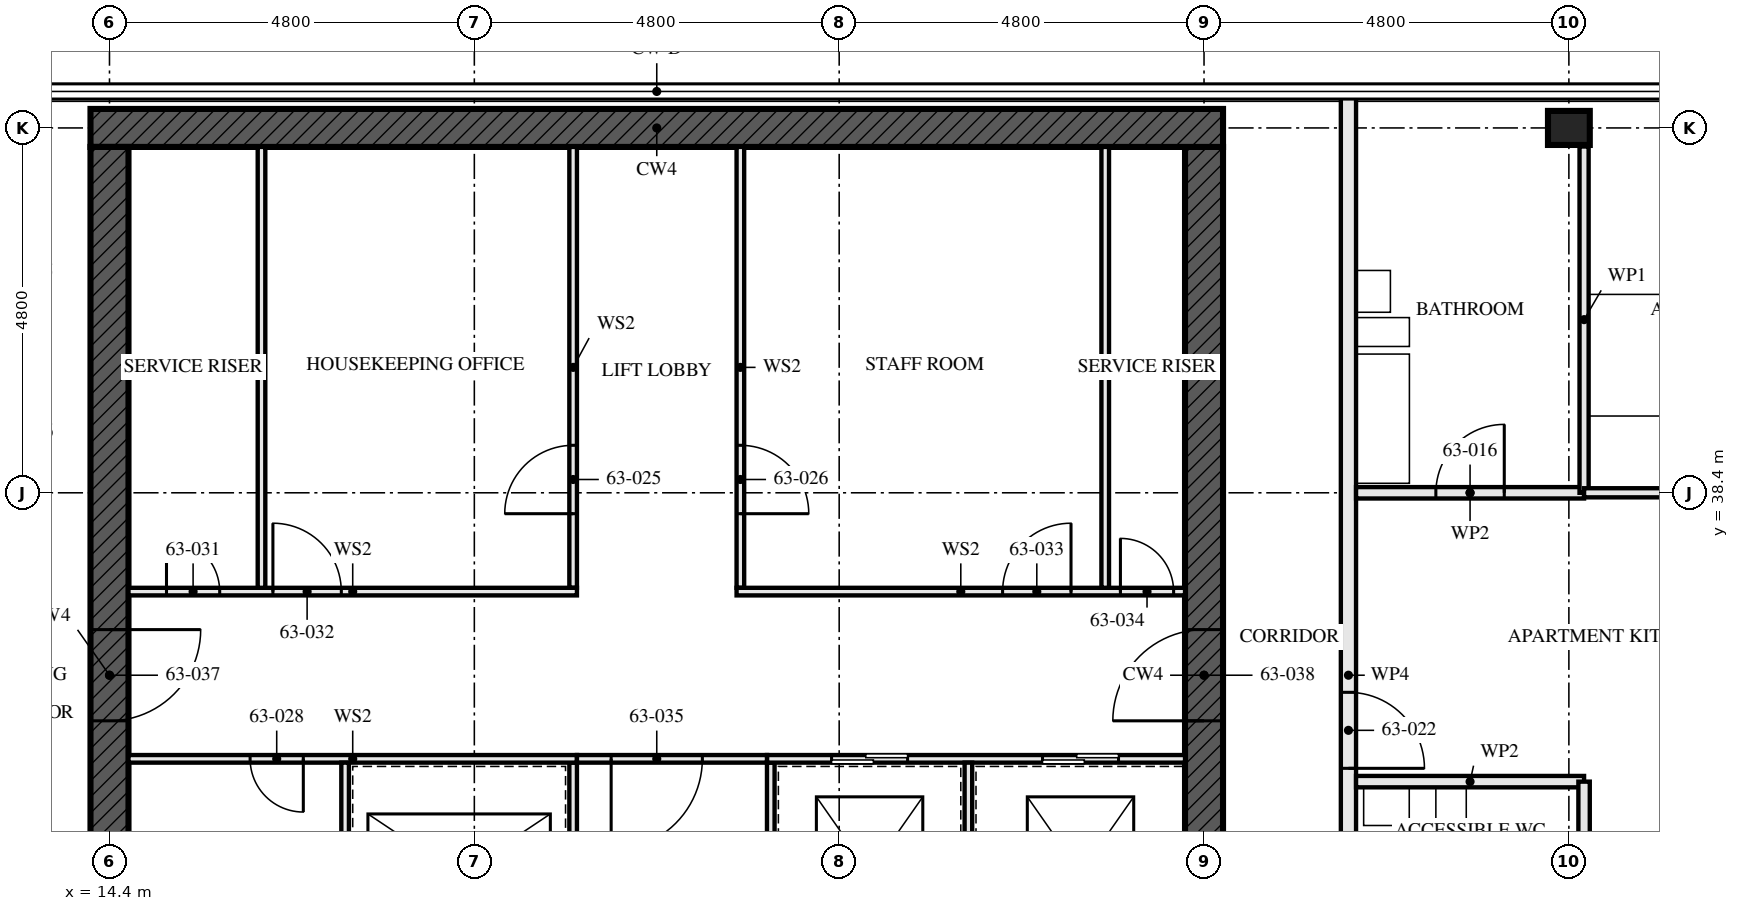
"""IFC4 building model, lengths in metres.
Left out: names, types, materials, properties, quantities, classifications, styles, units other than length and angle.
Written with IfcOpenShell. Run it as: python <this file> out.ifc"""

import sys

from ifc_helpers import new_model, si_unit, direction, frame, frame_2d, origin, origin_2d, place, context, subcontext, project, spatial, rectangle, i_section, extrude, element, fill, save


model = new_model("IFC4")
c1 = context("Model", 3, precision=1e-05, world=origin(), true_north=direction((0.0, 1.0)))
c2 = subcontext(c1, "Body", "Model", "MODEL_VIEW")
j1 = project(units=[si_unit("LENGTHUNIT", "METRE"), si_unit("PLANEANGLEUNIT", "RADIAN")], contexts=[c1])
p1 = place(None, origin())
s1 = spatial("IfcSite", under=j1, at=p1, CompositionType="ELEMENT")
p2 = place(p1, origin())
s2 = spatial("IfcBuilding", under=s1, at=p2, CompositionType="ELEMENT")
p3 = place(p2, frame((0.0, 0.0, 229.5)))
s3 = spatial("IfcBuildingStorey", under=s2, at=p3, CompositionType="ELEMENT", Elevation=229.5)
p4 = place(p3, frame((33.6, 43.2, 0.0), z_axis=(0.0, 0.0, 1.0), x_axis=(0.0, 1.0, 0.0)))
e1 = element("IfcColumn", 1, at=p4, inside=s3, PredefinedType="COLUMN", context=c2, shape_type="SweptSolid", body=[
    extrude(i_section(OverallWidth=0.448, OverallDepth=0.55, WebThickness=0.072, FlangeThickness=0.115, FilletRadius=0.015, at=origin_2d()), origin(), (0.0, 0.0, 1.0), 3.5),
])
p5 = place(p3, frame((29.05, 43.2, -0.17), z_axis=(0.0, 0.0, 1.0), x_axis=(-1.0, 0.0, 0.0)))
e2 = element("IfcWall", 2, at=p5, inside=s3, PredefinedType="SHEAR", context=c2, shape_type="SweptSolid", body=[
    extrude(rectangle(XDim=14.9, YDim=0.5, at=frame_2d((7.45, 0.0))), origin(), (0.0, 0.0, 1.0), 3.5),
])
p6 = place(p3, frame((14.4, 42.95, -0.17), z_axis=(0.0, 0.0, 1.0), x_axis=(0.0, -1.0, 0.0)))
e3 = element("IfcWall", 3, at=p6, inside=s3, PredefinedType="SHEAR", context=c2, shape_type="SweptSolid", body=[
    extrude(rectangle(XDim=13.9, YDim=0.5, at=frame_2d((6.95, 0.0))), origin(), (0.0, 0.0, 1.0), 3.5),
])
p7 = place(p6, frame((6.35, 0.0, 0.17)))
e4 = element("IfcOpeningElement", 4, at=p7, cuts=e3, PredefinedType="OPENING", context=c2, shape_type="SweptSolid", body=[
    extrude(rectangle(XDim=1.2, YDim=2.1, at=frame_2d((0.6, 1.05))), frame((0.0, 0.26, 0.0), z_axis=(0.0, -1.0, 0.0), x_axis=(1.0, 0.0, 0.0)), (0.0, 0.0, 1.0), 0.521),
])
p8 = place(p3, frame((28.8, 29.05, -0.17), z_axis=(0.0, 0.0, 1.0), x_axis=(0.0, 1.0, 0.0)))
e5 = element("IfcWall", 5, at=p8, inside=s3, PredefinedType="SHEAR", context=c2, shape_type="SweptSolid", body=[
    extrude(rectangle(XDim=13.9, YDim=0.5, at=frame_2d((6.95, 0.0))), origin(), (0.0, 0.0, 1.0), 3.5),
])
p9 = place(p8, frame((6.35, 0.0, 0.17)))
e6 = element("IfcOpeningElement", 6, at=p9, cuts=e5, PredefinedType="OPENING", context=c2, shape_type="SweptSolid", body=[
    extrude(rectangle(XDim=1.2, YDim=2.1, at=frame_2d((0.6, 1.05))), frame((0.0, 0.26, 0.0), z_axis=(0.0, -1.0, 0.0), x_axis=(1.0, 0.0, 0.0)), (0.0, 0.0, 1.0), 0.521),
])
p10 = place(p3, frame((33.8, 32.2, 0.0), z_axis=(0.0, 0.0, 1.0), x_axis=(0.0, 1.0, 0.0)))
e7 = element("IfcWall", 7, at=p10, inside=s3, PredefinedType="PARTITIONING", context=c2, shape_type="SweptSolid", body=[
    extrude(rectangle(XDim=2.4, YDim=0.15, at=frame_2d((1.2, 0.0))), origin(), (0.0, 0.0, 1.0), 2.55),
])
p11 = place(p3, frame((33.8, 34.6, 0.0), z_axis=(0.0, 0.0, 1.0), x_axis=(-1.0, 0.0, 0.0)))
e8 = element("IfcWall", 8, at=p11, inside=s3, PredefinedType="PARTITIONING", context=c2, shape_type="SweptSolid", body=[
    extrude(rectangle(XDim=3.0, YDim=0.15, at=frame_2d((1.5, 0.0))), origin(), (0.0, 0.0, 1.0), 3.33),
])
p12 = place(p3, frame((33.8, 38.4, 0.0), z_axis=(0.0, 0.0, 1.0), x_axis=(-1.0, 0.0, 0.0)))
e9 = element("IfcWall", 9, at=p12, inside=s3, PredefinedType="PARTITIONING", context=c2, shape_type="SweptSolid", body=[
    extrude(rectangle(XDim=3.0, YDim=0.15, at=frame_2d((1.5, 0.0))), origin(), (0.0, 0.0, 1.0), 2.55),
])
p13 = place(p12, frame((1.05, 0.0, 0.0)))
e10 = element("IfcOpeningElement", 10, at=p13, cuts=e9, PredefinedType="OPENING", context=c2, shape_type="SweptSolid", body=[
    extrude(rectangle(XDim=0.9, YDim=2.1, at=frame_2d((0.45, 1.05))), frame((0.0, 0.085, 0.0), z_axis=(0.0, -1.0, 0.0), x_axis=(1.0, 0.0, 0.0)), (0.0, 0.0, 1.0), 0.171),
])
p14 = place(p3, frame((33.8, 38.4, 0.0), z_axis=(0.0, 0.0, 1.0), x_axis=(0.0, 1.0, 0.0)))
e11 = element("IfcWall", 11, at=p14, inside=s3, PredefinedType="PARTITIONING", context=c2, shape_type="SweptSolid", body=[
    extrude(rectangle(XDim=4.556, YDim=0.12, at=frame_2d((2.278, 0.0))), origin(), (0.0, 0.0, 1.0), 3.33),
])
p15 = place(p3, frame((38.08, 38.4, 0.0), z_axis=(0.0, 0.0, 1.0), x_axis=(-1.0, 0.0, 0.0)))
e12 = element("IfcWall", 12, at=p15, inside=s3, PredefinedType="PARTITIONING", context=c2, shape_type="SweptSolid", body=[
    extrude(rectangle(XDim=4.28, YDim=0.12, at=frame_2d((2.14, 0.0))), origin(), (0.0, 0.0, 1.0), 2.55),
])
p16 = place(p15, frame((1.93, 0.0, 0.0)))
e13 = element("IfcOpeningElement", 13, at=p16, cuts=e12, PredefinedType="OPENING", context=c2, shape_type="SweptSolid", body=[
    extrude(rectangle(XDim=0.9, YDim=2.1, at=frame_2d((0.45, 1.05))), frame((0.0, 0.071, 0.0), z_axis=(0.0, -1.0, 0.0), x_axis=(1.0, 0.0, 0.0)), (0.0, 0.0, 1.0), 0.141),
])
p17 = place(p3, frame((30.7, 28.345, 0.0), z_axis=(0.0, 0.0, 1.0), x_axis=(0.0, 1.0, 0.0)))
e14 = element("IfcWall", 14, at=p17, inside=s3, PredefinedType="PARTITIONING", context=c2, shape_type="SweptSolid", body=[
    extrude(rectangle(XDim=15.31, YDim=0.2, at=frame_2d((7.655, 0.0))), origin(), (0.0, 0.0, 1.0), 2.32),
])
p18 = place(p17, frame((1.855, 0.0, 0.0)))
e15 = element("IfcOpeningElement", 15, at=p18, cuts=e14, PredefinedType="OPENING", context=c2, shape_type="SweptSolid", body=[
    extrude(rectangle(XDim=1.0, YDim=2.1, at=frame_2d((0.5, 1.05))), frame((0.0, 0.111, 0.0), z_axis=(0.0, -1.0, 0.0), x_axis=(1.0, 0.0, 0.0)), (0.0, 0.0, 1.0), 0.221),
])
p19 = place(p17, frame((4.555, 0.0, 0.0)))
e16 = element("IfcOpeningElement", 16, at=p19, cuts=e14, PredefinedType="OPENING", context=c2, shape_type="SweptSolid", body=[
    extrude(rectangle(XDim=1.0, YDim=2.1, at=frame_2d((0.5, 1.05))), frame((0.0, 0.111, 0.0), z_axis=(0.0, -1.0, 0.0), x_axis=(1.0, 0.0, 0.0)), (0.0, 0.0, 1.0), 0.221),
])
p20 = place(p17, frame((6.43, 0.0, 0.0)))
e17 = element("IfcOpeningElement", 17, at=p20, cuts=e14, PredefinedType="OPENING", context=c2, shape_type="SweptSolid", body=[
    extrude(rectangle(XDim=1.0, YDim=2.1, at=frame_2d((0.5, 1.05))), frame((0.0, 0.111, 0.0), z_axis=(0.0, -1.0, 0.0), x_axis=(1.0, 0.0, 0.0)), (0.0, 0.0, 1.0), 0.221),
])
for number, where, z_axis, x_axis in (
    (18, (16.4, 37.15, 0.0), (0.0, 0.0, 1.0), (0.0, 1.0, 0.0)),
    (19, (27.5, 37.15, 0.0), (0.0, 0.0, 1.0), (0.0, 1.0, 0.0)),
):
    element("IfcWall", number, at=place(p3, frame(where, z_axis=z_axis, x_axis=x_axis)), inside=s3, PredefinedType="SOLIDWALL", context=c2, shape_type="SweptSolid", body=[
        extrude(rectangle(XDim=5.8, YDim=0.1, at=frame_2d((2.9, 0.0))), origin(), (0.0, 0.0, 1.0), 3.33),
    ])
p21 = place(p3, frame((20.5, 29.05, 0.0), z_axis=(0.0, 0.0, 1.0), x_axis=(0.0, 1.0, 0.0)))
e20 = element("IfcWall", 20, at=p21, inside=s3, PredefinedType="SOLIDWALL", context=c2, shape_type="SweptSolid", body=[
    extrude(rectangle(XDim=5.8, YDim=0.1, at=frame_2d((2.9, 0.0))), origin(), (0.0, 0.0, 1.0), 3.33),
])
p22 = place(p21, frame((0.8, 0.0, 0.0)))
e21 = element("IfcOpeningElement", 21, at=p22, cuts=e20, PredefinedType="OPENING", context=c2, shape_type="SweptSolid", body=[
    extrude(rectangle(XDim=1.1, YDim=2.3, at=frame_2d((0.55, 1.15))), frame((0.0, 0.061, 0.0), z_axis=(0.0, -1.0, 0.0), x_axis=(1.0, 0.0, 0.0)), (0.0, 0.0, 1.0), 0.121),
])
p23 = place(p21, frame((3.775, 0.0, 0.0)))
e22 = element("IfcOpeningElement", 22, at=p23, cuts=e20, PredefinedType="OPENING", context=c2, shape_type="SweptSolid", body=[
    extrude(rectangle(XDim=1.1, YDim=2.3, at=frame_2d((0.55, 1.15))), frame((0.0, 0.061, 0.0), z_axis=(0.0, -1.0, 0.0), x_axis=(1.0, 0.0, 0.0)), (0.0, 0.0, 1.0), 0.121),
])
p24 = place(p3, frame((20.5, 37.15, 0.0), z_axis=(0.0, 0.0, 1.0), x_axis=(0.0, 1.0, 0.0)))
e23 = element("IfcWall", 23, at=p24, inside=s3, PredefinedType="SOLIDWALL", context=c2, shape_type="SweptSolid", body=[
    extrude(rectangle(XDim=5.8, YDim=0.1, at=frame_2d((2.9, 0.0))), origin(), (0.0, 0.0, 1.0), 3.33),
])
p25 = place(p24, frame((0.975, 0.0, 0.0)))
e24 = element("IfcOpeningElement", 24, at=p25, cuts=e23, PredefinedType="OPENING", context=c2, shape_type="SweptSolid", body=[
    extrude(rectangle(XDim=0.9, YDim=2.1, at=frame_2d((0.45, 1.05))), frame((0.0, 0.061, 0.0), z_axis=(0.0, -1.0, 0.0), x_axis=(1.0, 0.0, 0.0)), (0.0, 0.0, 1.0), 0.121),
])
p26 = place(p3, frame((22.7, 37.15, 0.0), z_axis=(0.0, 0.0, 1.0), x_axis=(0.0, 1.0, 0.0)))
e25 = element("IfcWall", 25, at=p26, inside=s3, PredefinedType="SOLIDWALL", context=c2, shape_type="SweptSolid", body=[
    extrude(rectangle(XDim=5.8, YDim=0.1, at=frame_2d((2.9, 0.0))), origin(), (0.0, 0.0, 1.0), 3.33),
])
p27 = place(p26, frame((0.975, 0.0, 0.0)))
e26 = element("IfcOpeningElement", 26, at=p27, cuts=e25, PredefinedType="OPENING", context=c2, shape_type="SweptSolid", body=[
    extrude(rectangle(XDim=0.9, YDim=2.1, at=frame_2d((0.45, 1.05))), frame((0.0, 0.061, 0.0), z_axis=(0.0, -1.0, 0.0), x_axis=(1.0, 0.0, 0.0)), (0.0, 0.0, 1.0), 0.121),
])
p28 = place(p3, frame((23.1, 29.05, 0.0), z_axis=(0.0, 0.0, 1.0), x_axis=(0.0, 1.0, 0.0)))
e27 = element("IfcWall", 27, at=p28, inside=s3, PredefinedType="SOLIDWALL", context=c2, shape_type="SweptSolid", body=[
    extrude(rectangle(XDim=5.8, YDim=0.1, at=frame_2d((2.9, 0.0))), origin(), (0.0, 0.0, 1.0), 3.33),
])
p29 = place(p28, frame((1.0, 0.0, 0.0)))
e28 = element("IfcOpeningElement", 28, at=p29, cuts=e27, PredefinedType="OPENING", context=c2, shape_type="SweptSolid", body=[
    extrude(rectangle(XDim=0.7, YDim=2.1, at=frame_2d((0.35, 1.05))), frame((0.0, 0.061, 0.0), z_axis=(0.0, -1.0, 0.0), x_axis=(1.0, 0.0, 0.0)), (0.0, 0.0, 1.0), 0.121),
])
p30 = place(p3, frame((14.65, 34.9, 0.0), z_axis=(0.0, 0.0, 1.0), x_axis=(1.0, 0.0, 0.0)))
e29 = element("IfcWall", 29, at=p30, inside=s3, PredefinedType="SOLIDWALL", context=c2, shape_type="SweptSolid", body=[
    extrude(rectangle(XDim=5.9, YDim=0.1, at=frame_2d((2.95, 0.0))), origin(), (0.0, 0.0, 1.0), 3.33),
])
p31 = place(p30, frame((1.6, 0.0, 0.0)))
e30 = element("IfcOpeningElement", 30, at=p31, cuts=e29, PredefinedType="OPENING", context=c2, shape_type="SweptSolid", body=[
    extrude(rectangle(XDim=0.7, YDim=2.1, at=frame_2d((0.35, 1.05))), frame((0.0, 0.061, 0.0), z_axis=(0.0, -1.0, 0.0), x_axis=(1.0, 0.0, 0.0)), (0.0, 0.0, 1.0), 0.121),
])
p32 = place(p3, frame((23.05, 34.9, 0.0), z_axis=(0.0, 0.0, 1.0), x_axis=(1.0, 0.0, 0.0)))
e31 = element("IfcWall", 31, at=p32, inside=s3, PredefinedType="SOLIDWALL", context=c2, shape_type="SweptSolid", body=[
    extrude(rectangle(XDim=5.5, YDim=0.1, at=frame_2d((2.75, 0.0))), origin(), (0.0, 0.0, 1.0), 3.33),
])
p33 = place(p32, frame((0.85, 0.0, 0.0)))
e32 = element("IfcOpeningElement", 32, at=p33, cuts=e31, PredefinedType="OPENING", context=c2, shape_type="SweptSolid", body=[
    extrude(rectangle(XDim=1.0, YDim=2.1, at=frame_2d((0.5, 1.05))), frame((0.0, 0.061, 0.0), z_axis=(0.0, -1.0, 0.0), x_axis=(1.0, 0.0, 0.0)), (0.0, 0.0, 1.0), 0.121),
])
p34 = place(p32, frame((3.625, 0.0, 0.0)))
e33 = element("IfcOpeningElement", 33, at=p34, cuts=e31, PredefinedType="OPENING", context=c2, shape_type="SweptSolid", body=[
    extrude(rectangle(XDim=1.0, YDim=2.1, at=frame_2d((0.5, 1.05))), frame((0.0, 0.061, 0.0), z_axis=(0.0, -1.0, 0.0), x_axis=(1.0, 0.0, 0.0)), (0.0, 0.0, 1.0), 0.121),
])
p35 = place(p3, frame((14.65, 37.1, 0.0), z_axis=(0.0, 0.0, 1.0), x_axis=(1.0, 0.0, 0.0)))
e34 = element("IfcWall", 34, at=p35, inside=s3, PredefinedType="SOLIDWALL", context=c2, shape_type="SweptSolid", body=[
    extrude(rectangle(XDim=5.9, YDim=0.1, at=frame_2d((2.95, 0.0))), origin(), (0.0, 0.0, 1.0), 3.33),
])
p36 = place(p35, frame((0.5, 0.0, 0.0)))
e35 = element("IfcOpeningElement", 35, at=p36, cuts=e34, PredefinedType="OPENING", context=c2, shape_type="SweptSolid", body=[
    extrude(rectangle(XDim=0.7, YDim=2.1, at=frame_2d((0.35, 1.05))), frame((0.0, 0.061, 0.0), z_axis=(0.0, -1.0, 0.0), x_axis=(1.0, 0.0, 0.0)), (0.0, 0.0, 1.0), 0.121),
])
p37 = place(p35, frame((1.9, 0.0, 0.0)))
e36 = element("IfcOpeningElement", 36, at=p37, cuts=e34, PredefinedType="OPENING", context=c2, shape_type="SweptSolid", body=[
    extrude(rectangle(XDim=0.9, YDim=2.1, at=frame_2d((0.45, 1.05))), frame((0.0, 0.061, 0.0), z_axis=(0.0, -1.0, 0.0), x_axis=(1.0, 0.0, 0.0)), (0.0, 0.0, 1.0), 0.121),
])
p38 = place(p3, frame((22.65, 37.1, 0.0), z_axis=(0.0, 0.0, 1.0), x_axis=(1.0, 0.0, 0.0)))
e37 = element("IfcWall", 37, at=p38, inside=s3, PredefinedType="SOLIDWALL", context=c2, shape_type="SweptSolid", body=[
    extrude(rectangle(XDim=5.9, YDim=0.1, at=frame_2d((2.95, 0.0))), origin(), (0.0, 0.0, 1.0), 3.33),
])
p39 = place(p38, frame((3.5, 0.0, 0.0)))
e38 = element("IfcOpeningElement", 38, at=p39, cuts=e37, PredefinedType="OPENING", context=c2, shape_type="SweptSolid", body=[
    extrude(rectangle(XDim=0.9, YDim=2.1, at=frame_2d((0.45, 1.05))), frame((0.0, 0.061, 0.0), z_axis=(0.0, -1.0, 0.0), x_axis=(1.0, 0.0, 0.0)), (0.0, 0.0, 1.0), 0.121),
])
p40 = place(p38, frame((5.05, 0.0, 0.0)))
e39 = element("IfcOpeningElement", 39, at=p40, cuts=e37, PredefinedType="OPENING", context=c2, shape_type="SweptSolid", body=[
    extrude(rectangle(XDim=0.7, YDim=2.1, at=frame_2d((0.35, 1.05))), frame((0.0, 0.061, 0.0), z_axis=(0.0, -1.0, 0.0), x_axis=(1.0, 0.0, 0.0)), (0.0, 0.0, 1.0), 0.121),
])
p41 = place(p3, frame((20.55, 34.9, 0.0), z_axis=(0.0, 0.0, 1.0), x_axis=(1.0, 0.0, 0.0)))
e40 = element("IfcWall", 40, at=p41, inside=s3, PredefinedType="SOLIDWALL", context=c2, shape_type="SweptSolid", body=[
    extrude(rectangle(XDim=2.5, YDim=0.1, at=frame_2d((1.25, 0.0))), origin(), (0.0, 0.0, 1.0), 3.33),
])
p42 = place(p41, frame((0.45, 0.0, 0.0)))
e41 = element("IfcOpeningElement", 41, at=p42, cuts=e40, PredefinedType="OPENING", context=c2, shape_type="SweptSolid", body=[
    extrude(rectangle(XDim=1.2, YDim=2.1, at=frame_2d((0.6, 1.05))), frame((0.0, 0.061, 0.0), z_axis=(0.0, -1.0, 0.0), x_axis=(1.0, 0.0, 0.0)), (0.0, 0.0, 1.0), 0.121),
])
p43 = place(p3, frame((17.5, 29.05, 0.0), z_axis=(0.0, 0.0, 1.0), x_axis=(0.0, 1.0, 0.0)))
e42 = element("IfcWall", 42, at=p43, inside=s3, PredefinedType="SOLIDWALL", context=c2, shape_type="SweptSolid", body=[
    extrude(rectangle(XDim=5.8, YDim=0.1, at=frame_2d((2.9, 0.0))), origin(), (0.0, 0.0, 1.0), 3.33),
])
p44 = place(p3, frame((25.7, 31.95, 0.0), z_axis=(0.0, 0.0, 1.0), x_axis=(0.0, 1.0, 0.0)))
e43 = element("IfcWall", 43, at=p44, inside=s3, PredefinedType="SOLIDWALL", context=c2, shape_type="SweptSolid", body=[
    extrude(rectangle(XDim=2.9, YDim=0.1, at=frame_2d((1.45, 0.0))), origin(), (0.0, 0.0, 1.0), 3.33),
])
p45 = place(p13, frame((0.9, 0.0, 0.0), z_axis=(0.0, 0.0, 1.0), x_axis=(-1.0, 0.0, 0.0)))
e44 = element("IfcDoor", 44, at=p45, inside=s3, OperationType="SINGLE_SWING_LEFT", PredefinedType="DOOR", context=c2, shape_type="SweptSolid", body=[
    extrude(rectangle(XDim=0.9, YDim=2.1, at=frame_2d((0.45, 1.05))), frame((0.0, 0.022, 0.0), z_axis=(0.0, -1.0, 0.0), x_axis=(1.0, 0.0, 0.0)), (0.0, 0.0, 1.0), 0.044),
])
fill(e10, e44)
p46 = place(p20, frame((1.0, 0.0, 0.0), z_axis=(0.0, 0.0, 1.0), x_axis=(-1.0, 0.0, 0.0)))
e45 = element("IfcDoor", 45, at=p46, inside=s3, OperationType="SINGLE_SWING_LEFT", PredefinedType="DOOR", context=c2, shape_type="SweptSolid", body=[
    extrude(rectangle(XDim=1.0, YDim=2.1, at=frame_2d((0.5, 1.05))), frame((0.0, 0.027, 0.0), z_axis=(0.0, -1.0, 0.0), x_axis=(1.0, 0.0, 0.0)), (0.0, 0.0, 1.0), 0.054),
])
fill(e17, e45)
p47 = place(p25, origin())
e46 = element("IfcDoor", 46, at=p47, inside=s3, OperationType="SINGLE_SWING_RIGHT", PredefinedType="DOOR", context=c2, shape_type="SweptSolid", body=[
    extrude(rectangle(XDim=0.9, YDim=2.1, at=frame_2d((0.45, 1.05))), frame((0.0, 0.027, 0.0), z_axis=(0.0, -1.0, 0.0), x_axis=(1.0, 0.0, 0.0)), (0.0, 0.0, 1.0), 0.054),
])
fill(e24, e46)
p48 = place(p27, frame((0.9, 0.0, 0.0), z_axis=(0.0, 0.0, 1.0), x_axis=(-1.0, 0.0, 0.0)))
e47 = element("IfcDoor", 47, at=p48, inside=s3, OperationType="SINGLE_SWING_LEFT", PredefinedType="DOOR", context=c2, shape_type="SweptSolid", body=[
    extrude(rectangle(XDim=0.9, YDim=2.1, at=frame_2d((0.45, 1.05))), frame((0.0, 0.027, 0.0), z_axis=(0.0, -1.0, 0.0), x_axis=(1.0, 0.0, 0.0)), (0.0, 0.0, 1.0), 0.054),
])
fill(e26, e47)
p49 = place(p31, frame((0.7, 0.0, 0.0), z_axis=(0.0, 0.0, 1.0), x_axis=(-1.0, 0.0, 0.0)))
e48 = element("IfcDoor", 48, at=p49, inside=s3, OperationType="SINGLE_SWING_RIGHT", PredefinedType="DOOR", context=c2, shape_type="SweptSolid", body=[
    extrude(rectangle(XDim=0.7, YDim=2.1, at=frame_2d((0.35, 1.05))), frame((0.0, 0.027, 0.0), z_axis=(0.0, -1.0, 0.0), x_axis=(1.0, 0.0, 0.0)), (0.0, 0.0, 1.0), 0.054),
])
fill(e30, e48)
p50 = place(p33, origin())
e49 = element("IfcDoor", 49, at=p50, inside=s3, OperationType="SLIDING_TO_LEFT", PredefinedType="DOOR", context=c2, shape_type="SweptSolid", body=[
    extrude(rectangle(XDim=1.0, YDim=2.1, at=frame_2d((0.5, 1.05))), frame((0.0, 0.05, 0.0), z_axis=(0.0, -1.0, 0.0), x_axis=(1.0, 0.0, 0.0)), (0.0, 0.0, 1.0), 0.1),
])
fill(e32, e49)
p51 = place(p34, origin())
e50 = element("IfcDoor", 50, at=p51, inside=s3, OperationType="SLIDING_TO_LEFT", PredefinedType="DOOR", context=c2, shape_type="SweptSolid", body=[
    extrude(rectangle(XDim=1.0, YDim=2.1, at=frame_2d((0.5, 1.05))), frame((0.0, 0.05, 0.0), z_axis=(0.0, -1.0, 0.0), x_axis=(1.0, 0.0, 0.0)), (0.0, 0.0, 1.0), 0.1),
])
fill(e33, e50)
p52 = place(p36, origin())
e51 = element("IfcDoor", 51, at=p52, inside=s3, OperationType="SINGLE_SWING_RIGHT", PredefinedType="DOOR", context=c2, shape_type="SweptSolid", body=[
    extrude(rectangle(XDim=0.7, YDim=2.1, at=frame_2d((0.35, 1.05))), frame((0.0, 0.027, 0.0), z_axis=(0.0, -1.0, 0.0), x_axis=(1.0, 0.0, 0.0)), (0.0, 0.0, 1.0), 0.054),
])
fill(e35, e51)
p53 = place(p37, origin())
e52 = element("IfcDoor", 52, at=p53, inside=s3, OperationType="SINGLE_SWING_RIGHT", PredefinedType="DOOR", context=c2, shape_type="SweptSolid", body=[
    extrude(rectangle(XDim=0.9, YDim=2.1, at=frame_2d((0.45, 1.05))), frame((0.0, 0.027, 0.0), z_axis=(0.0, -1.0, 0.0), x_axis=(1.0, 0.0, 0.0)), (0.0, 0.0, 1.0), 0.054),
])
fill(e36, e52)
p54 = place(p39, origin())
e53 = element("IfcDoor", 53, at=p54, inside=s3, OperationType="SINGLE_SWING_LEFT", PredefinedType="DOOR", context=c2, shape_type="SweptSolid", body=[
    extrude(rectangle(XDim=0.9, YDim=2.1, at=frame_2d((0.45, 1.05))), frame((0.0, 0.027, 0.0), z_axis=(0.0, -1.0, 0.0), x_axis=(1.0, 0.0, 0.0)), (0.0, 0.0, 1.0), 0.054),
])
fill(e38, e53)
p55 = place(p40, origin())
e54 = element("IfcDoor", 54, at=p55, inside=s3, OperationType="SINGLE_SWING_RIGHT", PredefinedType="DOOR", context=c2, shape_type="SweptSolid", body=[
    extrude(rectangle(XDim=0.7, YDim=2.1, at=frame_2d((0.35, 1.05))), frame((0.0, 0.027, 0.0), z_axis=(0.0, -1.0, 0.0), x_axis=(1.0, 0.0, 0.0)), (0.0, 0.0, 1.0), 0.054),
])
fill(e39, e54)
p56 = place(p42, frame((1.2, 0.0, 0.0), z_axis=(0.0, 0.0, 1.0), x_axis=(-1.0, 0.0, 0.0)))
e55 = element("IfcDoor", 55, at=p56, inside=s3, OperationType="SINGLE_SWING_LEFT", PredefinedType="DOOR", context=c2, shape_type="SweptSolid", body=[
    extrude(rectangle(XDim=1.2, YDim=2.1, at=frame_2d((0.6, 1.05))), frame((0.0, 0.027, 0.0), z_axis=(0.0, -1.0, 0.0), x_axis=(1.0, 0.0, 0.0)), (0.0, 0.0, 1.0), 0.054),
])
fill(e41, e55)
p57 = place(p7, origin())
e56 = element("IfcDoor", 56, at=p57, inside=s3, OperationType="SINGLE_SWING_LEFT", PredefinedType="DOOR", context=c2, shape_type="SweptSolid", body=[
    extrude(rectangle(XDim=1.2, YDim=2.1, at=frame_2d((0.6, 1.05))), frame((0.0, 0.027, 0.0), z_axis=(0.0, -1.0, 0.0), x_axis=(1.0, 0.0, 0.0)), (0.0, 0.0, 1.0), 0.054),
])
fill(e4, e56)
p58 = place(p9, origin())
e57 = element("IfcDoor", 57, at=p58, inside=s3, OperationType="SINGLE_SWING_LEFT", PredefinedType="DOOR", context=c2, shape_type="SweptSolid", body=[
    extrude(rectangle(XDim=1.2, YDim=2.1, at=frame_2d((0.6, 1.05))), frame((0.0, 0.027, 0.0), z_axis=(0.0, -1.0, 0.0), x_axis=(1.0, 0.0, 0.0)), (0.0, 0.0, 1.0), 0.054),
])
fill(e6, e57)
save(model, sys.argv[1])
